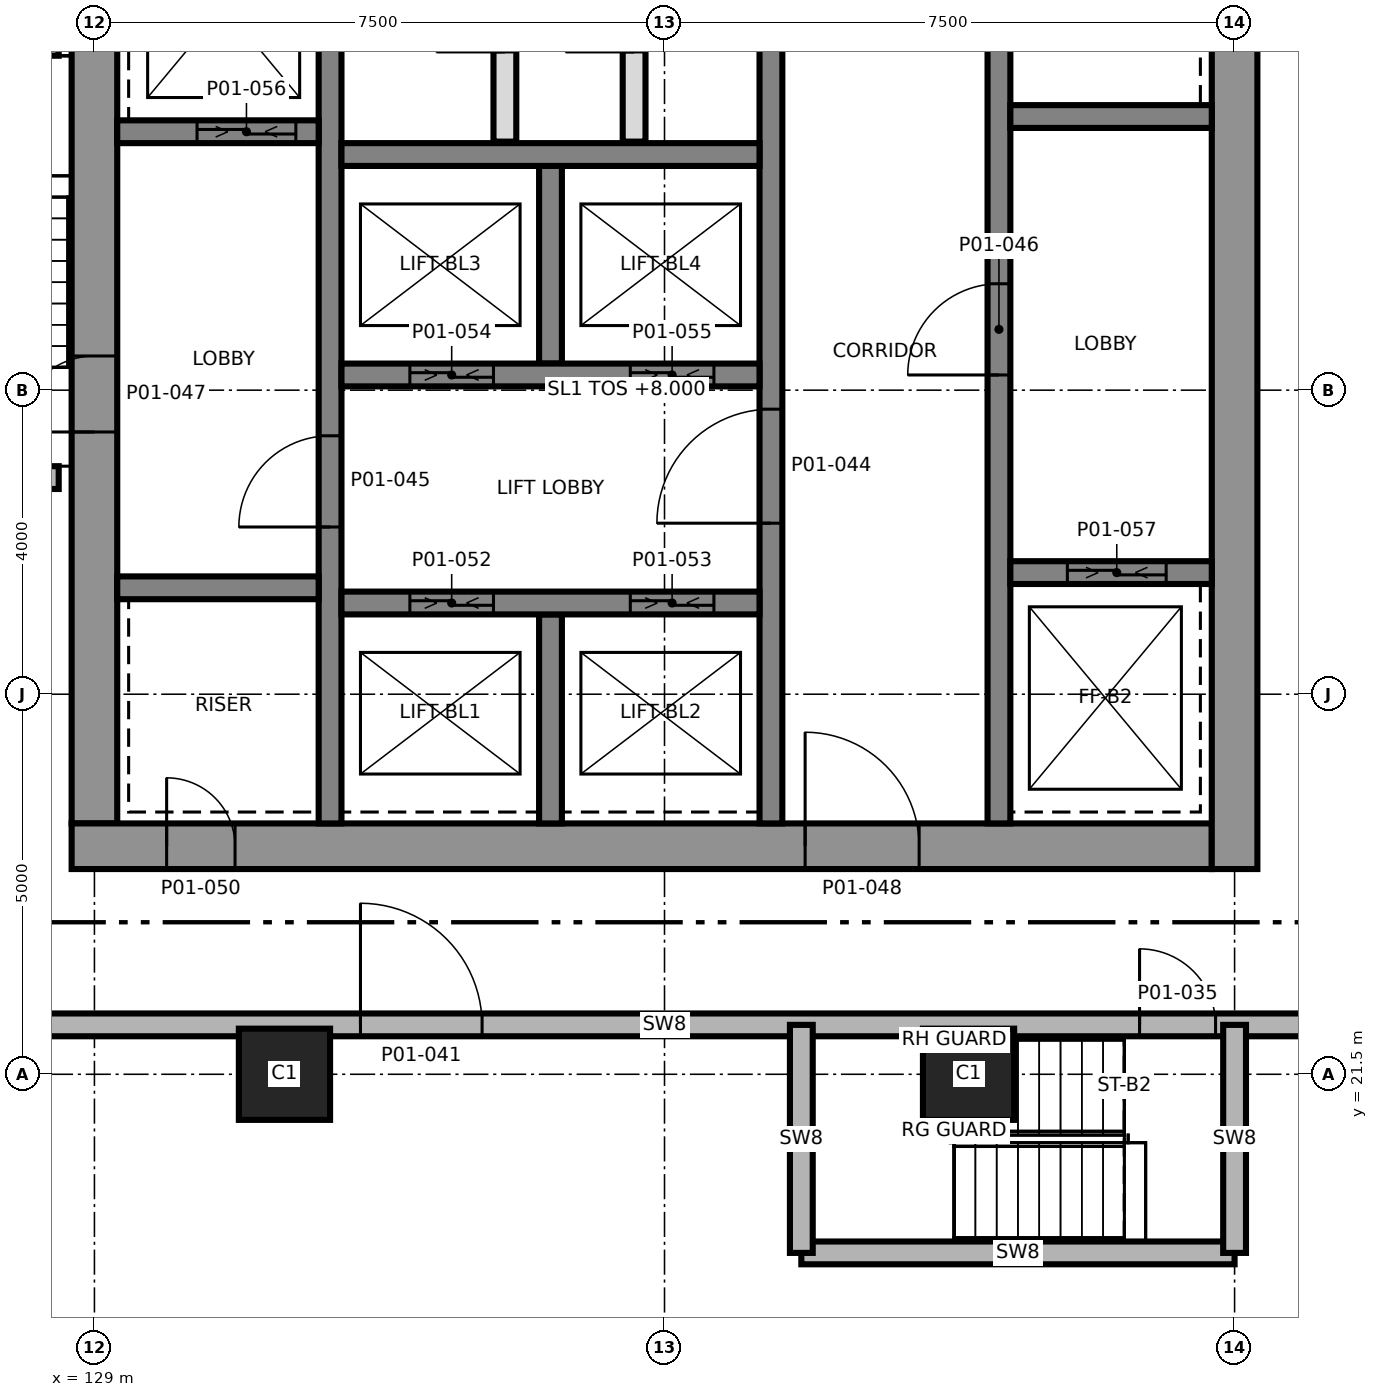
"""IFC4 building model, lengths in metres.
Left out: names, types, materials, properties, quantities, classifications, styles, units other than length and angle.
Written with IfcOpenShell. Run it as: python <this file> out.ifc"""

import sys

from ifc_helpers import new_model, si_unit, direction, frame, frame_2d, origin, origin_2d, place, context, subcontext, project, spatial, rectangle, extrude, element, fill, save


model = new_model("IFC4")
c1 = context("Model", 3, precision=1e-05, world=origin(), true_north=direction((0.0, 1.0)))
c2 = subcontext(c1, "Body", "Model", "MODEL_VIEW")
j1 = project(units=[si_unit("LENGTHUNIT", "METRE"), si_unit("PLANEANGLEUNIT", "RADIAN")], contexts=[c1])
p1 = place(None, origin())
s1 = spatial("IfcSite", under=j1, at=p1, CompositionType="ELEMENT")
p2 = place(p1, origin())
s2 = spatial("IfcBuilding", under=s1, at=p2, CompositionType="ELEMENT")
p3 = place(p2, frame((0.0, 0.0, 8.0)))
s3 = spatial("IfcBuildingStorey", under=s2, at=p3, CompositionType="ELEMENT", Elevation=8.0)
p4 = place(p3, frame((129.0, 24.8, 0.0), z_axis=(0.0, 0.0, 1.0), x_axis=(0.0, 1.0, 0.0)))
e1 = element("IfcWall", 1, at=p4, inside=s3, PredefinedType="SHEAR", context=c2, shape_type="SweptSolid", body=[
    extrude(rectangle(XDim=12.4, YDim=0.6, at=frame_2d((6.2, 0.0))), origin(), (0.0, 0.0, 1.0), 5.5),
])
p5 = place(p4, frame((5.15, 0.0, 0.0)))
e2 = element("IfcOpeningElement", 2, at=p5, cuts=e1, PredefinedType="OPENING", context=c2, shape_type="SweptSolid", body=[
    extrude(rectangle(XDim=1.0, YDim=2.1, at=frame_2d((0.5, 1.05))), frame((0.0, 0.31, 0.0), z_axis=(0.0, -1.0, 0.0), x_axis=(1.0, 0.0, 0.0)), (0.0, 0.0, 1.0), 0.62),
])
p6 = place(p3, frame((128.7, 24.5, 0.0), z_axis=(0.0, 0.0, 1.0), x_axis=(1.0, 0.0, 0.0)))
e3 = element("IfcWall", 3, at=p6, inside=s3, PredefinedType="SHEAR", context=c2, shape_type="SweptSolid", body=[
    extrude(rectangle(XDim=15.0, YDim=0.6, at=frame_2d((7.5, 0.0))), origin(), (0.0, 0.0, 1.0), 5.5),
])
p7 = place(p6, frame((9.65, 0.0, 0.0)))
e4 = element("IfcOpeningElement", 4, at=p7, cuts=e3, PredefinedType="OPENING", context=c2, shape_type="SweptSolid", body=[
    extrude(rectangle(XDim=1.5, YDim=2.1, at=frame_2d((0.75, 1.05))), frame((0.0, 0.31, 0.0), z_axis=(0.0, -1.0, 0.0), x_axis=(1.0, 0.0, 0.0)), (0.0, 0.0, 1.0), 0.62),
])
p8 = place(p6, frame((1.25, 0.0, 0.0)))
e5 = element("IfcOpeningElement", 5, at=p8, cuts=e3, PredefinedType="OPENING", context=c2, shape_type="SweptSolid", body=[
    extrude(rectangle(XDim=0.9, YDim=2.1, at=frame_2d((0.45, 1.05))), frame((0.0, 0.31, 0.0), z_axis=(0.0, -1.0, 0.0), x_axis=(1.0, 0.0, 0.0)), (0.0, 0.0, 1.0), 0.62),
])
p9 = place(p3, frame((144.0, 24.2, 0.0), z_axis=(0.0, 0.0, 1.0), x_axis=(0.0, 1.0, 0.0)))
e6 = element("IfcWall", 6, at=p9, inside=s3, PredefinedType="SHEAR", context=c2, shape_type="SweptSolid", body=[
    extrude(rectangle(XDim=13.6, YDim=0.6, at=frame_2d((6.8, 0.0))), origin(), (0.0, 0.0, 1.0), 5.5),
])
p10 = place(p3, frame((132.1, 24.8, 0.0), z_axis=(0.0, 0.0, 1.0), x_axis=(0.0, 1.0, 0.0)))
e7 = element("IfcWall", 7, at=p10, inside=s3, PredefinedType="SHEAR", context=c2, shape_type="SweptSolid", body=[
    extrude(rectangle(XDim=12.4, YDim=0.3, at=frame_2d((6.2, 0.0))), origin(), (0.0, 0.0, 1.0), 5.5),
])
p11 = place(p10, frame((3.9, 0.0, 0.0)))
e8 = element("IfcOpeningElement", 8, at=p11, cuts=e7, PredefinedType="OPENING", context=c2, shape_type="SweptSolid", body=[
    extrude(rectangle(XDim=1.2, YDim=2.1, at=frame_2d((0.6, 1.05))), frame((0.0, 0.16, 0.0), z_axis=(0.0, -1.0, 0.0), x_axis=(1.0, 0.0, 0.0)), (0.0, 0.0, 1.0), 0.32),
])
p12 = place(p3, frame((137.9, 24.8, 0.0), z_axis=(0.0, 0.0, 1.0), x_axis=(0.0, 1.0, 0.0)))
e9 = element("IfcWall", 9, at=p12, inside=s3, PredefinedType="SHEAR", context=c2, shape_type="SweptSolid", body=[
    extrude(rectangle(XDim=12.4, YDim=0.3, at=frame_2d((6.2, 0.0))), origin(), (0.0, 0.0, 1.0), 5.5),
])
p13 = place(p12, frame((3.95, 0.0, 0.0)))
e10 = element("IfcOpeningElement", 10, at=p13, cuts=e9, PredefinedType="OPENING", context=c2, shape_type="SweptSolid", body=[
    extrude(rectangle(XDim=1.5, YDim=2.1, at=frame_2d((0.75, 1.05))), frame((0.0, 0.16, 0.0), z_axis=(0.0, -1.0, 0.0), x_axis=(1.0, 0.0, 0.0)), (0.0, 0.0, 1.0), 0.32),
])
p14 = place(p12, frame((10.45, 0.0, 0.0)))
e11 = element("IfcOpeningElement", 11, at=p14, cuts=e9, PredefinedType="OPENING", context=c2, shape_type="SweptSolid", body=[
    extrude(rectangle(XDim=0.9, YDim=2.1, at=frame_2d((0.45, 1.05))), frame((0.0, 0.16, 0.0), z_axis=(0.0, -1.0, 0.0), x_axis=(1.0, 0.0, 0.0)), (0.0, 0.0, 1.0), 0.32),
])
p15 = place(p3, frame((140.9, 24.8, 0.0), z_axis=(0.0, 0.0, 1.0), x_axis=(0.0, 1.0, 0.0)))
e12 = element("IfcWall", 12, at=p15, inside=s3, PredefinedType="SHEAR", context=c2, shape_type="SweptSolid", body=[
    extrude(rectangle(XDim=12.4, YDim=0.3, at=frame_2d((6.2, 0.0))), origin(), (0.0, 0.0, 1.0), 5.5),
])
p16 = place(p15, frame((5.9, 0.0, 0.0)))
e13 = element("IfcOpeningElement", 13, at=p16, cuts=e12, PredefinedType="OPENING", context=c2, shape_type="SweptSolid", body=[
    extrude(rectangle(XDim=1.2, YDim=2.1, at=frame_2d((0.6, 1.05))), frame((0.0, 0.16, 0.0), z_axis=(0.0, -1.0, 0.0), x_axis=(1.0, 0.0, 0.0)), (0.0, 0.0, 1.0), 0.32),
])
p17 = place(p3, frame((135.0, 24.8, 0.0), z_axis=(0.0, 0.0, 1.0), x_axis=(0.0, 1.0, 0.0)))
e14 = element("IfcWall", 14, at=p17, inside=s3, PredefinedType="SHEAR", context=c2, shape_type="SweptSolid", body=[
    extrude(rectangle(XDim=2.75, YDim=0.3, at=frame_2d((1.375, 0.0))), origin(), (0.0, 0.0, 1.0), 5.5),
])
p18 = place(p3, frame((135.0, 30.85, 0.0), z_axis=(0.0, 0.0, 1.0), x_axis=(0.0, 1.0, 0.0)))
e15 = element("IfcWall", 15, at=p18, inside=s3, PredefinedType="SHEAR", context=c2, shape_type="SweptSolid", body=[
    extrude(rectangle(XDim=2.6, YDim=0.3, at=frame_2d((1.3, 0.0))), origin(), (0.0, 0.0, 1.0), 5.5),
])
p19 = place(p3, frame((132.25, 27.7, 0.0), z_axis=(0.0, 0.0, 1.0), x_axis=(1.0, 0.0, 0.0)))
e16 = element("IfcWall", 16, at=p19, inside=s3, PredefinedType="SHEAR", context=c2, shape_type="SweptSolid", body=[
    extrude(rectangle(XDim=5.5, YDim=0.3, at=frame_2d((2.75, 0.0))), origin(), (0.0, 0.0, 1.0), 5.5),
])
p20 = place(p19, frame((0.9, 0.0, 0.0)))
e17 = element("IfcOpeningElement", 17, at=p20, cuts=e16, PredefinedType="OPENING", context=c2, shape_type="SweptSolid", body=[
    extrude(rectangle(XDim=1.1, YDim=2.4, at=frame_2d((0.55, 1.2))), frame((0.0, 0.16, 0.0), z_axis=(0.0, -1.0, 0.0), x_axis=(1.0, 0.0, 0.0)), (0.0, 0.0, 1.0), 0.32),
])
p21 = place(p19, frame((3.8, 0.0, 0.0)))
e18 = element("IfcOpeningElement", 18, at=p21, cuts=e16, PredefinedType="OPENING", context=c2, shape_type="SweptSolid", body=[
    extrude(rectangle(XDim=1.1, YDim=2.4, at=frame_2d((0.55, 1.2))), frame((0.0, 0.16, 0.0), z_axis=(0.0, -1.0, 0.0), x_axis=(1.0, 0.0, 0.0)), (0.0, 0.0, 1.0), 0.32),
])
p22 = place(p3, frame((132.25, 30.7, 0.0), z_axis=(0.0, 0.0, 1.0), x_axis=(1.0, 0.0, 0.0)))
e19 = element("IfcWall", 19, at=p22, inside=s3, PredefinedType="SHEAR", context=c2, shape_type="SweptSolid", body=[
    extrude(rectangle(XDim=5.5, YDim=0.3, at=frame_2d((2.75, 0.0))), origin(), (0.0, 0.0, 1.0), 5.5),
])
p23 = place(p22, frame((0.9, 0.0, 0.0)))
e20 = element("IfcOpeningElement", 20, at=p23, cuts=e19, PredefinedType="OPENING", context=c2, shape_type="SweptSolid", body=[
    extrude(rectangle(XDim=1.1, YDim=2.4, at=frame_2d((0.55, 1.2))), frame((0.0, 0.16, 0.0), z_axis=(0.0, -1.0, 0.0), x_axis=(1.0, 0.0, 0.0)), (0.0, 0.0, 1.0), 0.32),
])
p24 = place(p22, frame((3.8, 0.0, 0.0)))
e21 = element("IfcOpeningElement", 21, at=p24, cuts=e19, PredefinedType="OPENING", context=c2, shape_type="SweptSolid", body=[
    extrude(rectangle(XDim=1.1, YDim=2.4, at=frame_2d((0.55, 1.2))), frame((0.0, 0.16, 0.0), z_axis=(0.0, -1.0, 0.0), x_axis=(1.0, 0.0, 0.0)), (0.0, 0.0, 1.0), 0.32),
])
p25 = place(p3, frame((132.25, 33.6, 0.0), z_axis=(0.0, 0.0, 1.0), x_axis=(1.0, 0.0, 0.0)))
e22 = element("IfcWall", 22, at=p25, inside=s3, PredefinedType="SHEAR", context=c2, shape_type="SweptSolid", body=[
    extrude(rectangle(XDim=5.5, YDim=0.3, at=frame_2d((2.75, 0.0))), origin(), (0.0, 0.0, 1.0), 5.5),
])
p26 = place(p3, frame((129.3, 27.9, 0.0), z_axis=(0.0, 0.0, 1.0), x_axis=(1.0, 0.0, 0.0)))
e23 = element("IfcWall", 23, at=p26, inside=s3, PredefinedType="SHEAR", context=c2, shape_type="SweptSolid", body=[
    extrude(rectangle(XDim=2.65, YDim=0.3, at=frame_2d((1.325, 0.0))), origin(), (0.0, 0.0, 1.0), 5.5),
])
p27 = place(p3, frame((129.3, 33.9, 0.0), z_axis=(0.0, 0.0, 1.0), x_axis=(1.0, 0.0, 0.0)))
e24 = element("IfcWall", 24, at=p27, inside=s3, PredefinedType="SHEAR", context=c2, shape_type="SweptSolid", body=[
    extrude(rectangle(XDim=2.65, YDim=0.3, at=frame_2d((1.325, 0.0))), origin(), (0.0, 0.0, 1.0), 5.5),
])
p28 = place(p27, frame((1.05, 0.0, 0.0)))
e25 = element("IfcOpeningElement", 25, at=p28, cuts=e24, PredefinedType="OPENING", context=c2, shape_type="SweptSolid", body=[
    extrude(rectangle(XDim=1.3, YDim=2.4, at=frame_2d((0.65, 1.2))), frame((0.0, 0.16, 0.0), z_axis=(0.0, -1.0, 0.0), x_axis=(1.0, 0.0, 0.0)), (0.0, 0.0, 1.0), 0.32),
])
p29 = place(p3, frame((141.05, 28.1, 0.0), z_axis=(0.0, 0.0, 1.0), x_axis=(1.0, 0.0, 0.0)))
e26 = element("IfcWall", 26, at=p29, inside=s3, PredefinedType="SHEAR", context=c2, shape_type="SweptSolid", body=[
    extrude(rectangle(XDim=2.65, YDim=0.3, at=frame_2d((1.325, 0.0))), origin(), (0.0, 0.0, 1.0), 5.5),
])
p30 = place(p29, frame((0.75, 0.0, 0.0)))
e27 = element("IfcOpeningElement", 27, at=p30, cuts=e26, PredefinedType="OPENING", context=c2, shape_type="SweptSolid", body=[
    extrude(rectangle(XDim=1.3, YDim=2.4, at=frame_2d((0.65, 1.2))), frame((0.0, 0.16, 0.0), z_axis=(0.0, -1.0, 0.0), x_axis=(1.0, 0.0, 0.0)), (0.0, 0.0, 1.0), 0.32),
])
p31 = place(p3, frame((141.05, 34.1, 0.0), z_axis=(0.0, 0.0, 1.0), x_axis=(1.0, 0.0, 0.0)))
e28 = element("IfcWall", 28, at=p31, inside=s3, PredefinedType="SHEAR", context=c2, shape_type="SweptSolid", body=[
    extrude(rectangle(XDim=2.65, YDim=0.3, at=frame_2d((1.325, 0.0))), origin(), (0.0, 0.0, 1.0), 5.5),
])
for number, where, z_axis, x_axis in (
    (29, (131.5, 21.5, 0.0), (0.0, 0.0, 1.0), (1.0, 0.0, 0.0)),
    (30, (140.5, 21.5, 0.0), (0.0, 0.0, 1.0), (1.0, 0.0, 0.0)),
):
    element("IfcColumn", number, at=place(p3, frame(where, z_axis=z_axis, x_axis=x_axis)), inside=s3, PredefinedType="COLUMN", context=c2, shape_type="SweptSolid", body=[
        extrude(rectangle(XDim=1.2, YDim=1.2, at=origin_2d()), origin(), (0.0, 0.0, 1.0), 5.5),
    ])
p32 = place(p3, frame((138.3, 19.15, 0.0), z_axis=(0.0, 0.0, 1.0), x_axis=(1.0, 0.0, 0.0)))
e31 = element("IfcWall", 31, at=p32, inside=s3, PredefinedType="SHEAR", context=c2, shape_type="SweptSolid", body=[
    extrude(rectangle(XDim=5.7, YDim=0.3, at=frame_2d((2.85, 0.0))), origin(), (0.0, 0.0, 1.0), 5.2),
])
p33 = place(p3, frame((125.75, 22.15, 0.0), z_axis=(0.0, 0.0, 1.0), x_axis=(1.0, 0.0, 0.0)))
e32 = element("IfcWall", 32, at=p33, inside=s3, PredefinedType="SHEAR", context=c2, shape_type="SweptSolid", body=[
    extrude(rectangle(XDim=21.5, YDim=0.3, at=frame_2d((10.75, 0.0))), origin(), (0.0, 0.0, 1.0), 5.2),
])
p34 = place(p33, frame((17.0, 0.0, 0.0)))
e33 = element("IfcOpeningElement", 33, at=p34, cuts=e32, PredefinedType="OPENING", context=c2, shape_type="SweptSolid", body=[
    extrude(rectangle(XDim=1.0, YDim=2.1, at=frame_2d((0.5, 1.05))), frame((0.0, 0.16, 0.0), z_axis=(0.0, -1.0, 0.0), x_axis=(1.0, 0.0, 0.0)), (0.0, 0.0, 1.0), 0.32),
])
p35 = place(p33, frame((6.75, 0.0, 0.0)))
e34 = element("IfcOpeningElement", 34, at=p35, cuts=e32, PredefinedType="OPENING", context=c2, shape_type="SweptSolid", body=[
    extrude(rectangle(XDim=1.6, YDim=2.1, at=frame_2d((0.8, 1.05))), frame((0.0, 0.16, 0.0), z_axis=(0.0, -1.0, 0.0), x_axis=(1.0, 0.0, 0.0)), (0.0, 0.0, 1.0), 0.32),
])
p36 = place(p3, frame((125.7, 29.35, 0.0), z_axis=(0.0, 0.0, 1.0), x_axis=(1.0, 0.0, 0.0)))
e35 = element("IfcWall", 35, at=p36, inside=s3, PredefinedType="SHEAR", context=c2, shape_type="SweptSolid", body=[
    extrude(rectangle(XDim=2.83, YDim=0.3, at=frame_2d((1.415, 0.0))), origin(), (0.0, 0.0, 1.0), 5.2),
])
p37 = place(p36, frame((0.975, 0.0, 0.0)))
e36 = element("IfcOpeningElement", 36, at=p37, cuts=e35, PredefinedType="OPENING", context=c2, shape_type="SweptSolid", body=[
    extrude(rectangle(XDim=1.2, YDim=2.1, at=frame_2d((0.6, 1.05))), frame((0.0, 0.16, 0.0), z_axis=(0.0, -1.0, 0.0), x_axis=(1.0, 0.0, 0.0)), (0.0, 0.0, 1.0), 0.32),
])
p38 = place(p3, frame((125.7, 35.05, 0.0), z_axis=(0.0, 0.0, 1.0), x_axis=(1.0, 0.0, 0.0)))
e37 = element("IfcWall", 37, at=p38, inside=s3, PredefinedType="SHEAR", context=c2, shape_type="SweptSolid", body=[
    extrude(rectangle(XDim=2.83, YDim=0.3, at=frame_2d((1.415, 0.0))), origin(), (0.0, 0.0, 1.0), 5.2),
])
p39 = place(p3, frame((134.4, 33.77, 0.0), z_axis=(0.0, 0.0, 1.0), x_axis=(0.0, 1.0, 0.0)))
e38 = element("IfcWall", 38, at=p39, inside=s3, PredefinedType="PARTITIONING", context=c2, shape_type="SweptSolid", body=[
    extrude(rectangle(XDim=3.26, YDim=0.3, at=frame_2d((1.63, 0.0))), origin(), (0.0, 0.0, 1.0), 5.2),
])
p40 = place(p39, frame((1.18, 0.0, 0.0)))
e39 = element("IfcOpeningElement", 39, at=p40, cuts=e38, PredefinedType="OPENING", context=c2, shape_type="SweptSolid", body=[
    extrude(rectangle(XDim=0.9, YDim=2.1, at=frame_2d((0.45, 1.05))), frame((0.0, 0.16, 0.0), z_axis=(0.0, -1.0, 0.0), x_axis=(1.0, 0.0, 0.0)), (0.0, 0.0, 1.0), 0.32),
])
p41 = place(p3, frame((136.1, 33.77, 0.0), z_axis=(0.0, 0.0, 1.0), x_axis=(0.0, 1.0, 0.0)))
e40 = element("IfcWall", 40, at=p41, inside=s3, PredefinedType="PARTITIONING", context=c2, shape_type="SweptSolid", body=[
    extrude(rectangle(XDim=3.26, YDim=0.3, at=frame_2d((1.63, 0.0))), origin(), (0.0, 0.0, 1.0), 5.2),
])
p42 = place(p41, frame((1.18, 0.0, 0.0)))
e41 = element("IfcOpeningElement", 41, at=p42, cuts=e40, PredefinedType="OPENING", context=c2, shape_type="SweptSolid", body=[
    extrude(rectangle(XDim=0.9, YDim=2.1, at=frame_2d((0.45, 1.05))), frame((0.0, 0.16, 0.0), z_axis=(0.0, -1.0, 0.0), x_axis=(1.0, 0.0, 0.0)), (0.0, 0.0, 1.0), 0.32),
])
for number, where, z_axis, x_axis in (
    (42, (138.3, 19.15, 0.0), (0.0, 0.0, 1.0), (0.0, 1.0, 0.0)),
    (43, (144.0, 19.15, 0.0), (0.0, 0.0, 1.0), (0.0, 1.0, 0.0)),
):
    element("IfcWall", number, at=place(p3, frame(where, z_axis=z_axis, x_axis=x_axis)), inside=s3, PredefinedType="SHEAR", context=c2, shape_type="SweptSolid", body=[
        extrude(rectangle(XDim=3.0, YDim=0.3, at=frame_2d((1.5, 0.0))), origin(), (0.0, 0.0, 1.0), 5.2),
    ])
p43 = place(p34, origin())
e44 = element("IfcDoor", 44, at=p43, inside=s3, OperationType="SINGLE_SWING_LEFT", PredefinedType="DOOR", context=c2, shape_type="SweptSolid", body=[
    extrude(rectangle(XDim=1.0, YDim=2.1, at=frame_2d((0.5, 1.05))), frame((0.0, 0.025, 0.0), z_axis=(0.0, -1.0, 0.0), x_axis=(1.0, 0.0, 0.0)), (0.0, 0.0, 1.0), 0.05),
])
fill(e33, e44)
p44 = place(p35, origin())
e45 = element("IfcDoor", 45, at=p44, inside=s3, OperationType="SINGLE_SWING_LEFT", PredefinedType="DOOR", context=c2, shape_type="SweptSolid", body=[
    extrude(rectangle(XDim=1.6, YDim=2.1, at=frame_2d((0.8, 1.05))), frame((0.0, 0.025, 0.0), z_axis=(0.0, -1.0, 0.0), x_axis=(1.0, 0.0, 0.0)), (0.0, 0.0, 1.0), 0.05),
])
fill(e34, e45)
p45 = place(p13, origin())
e46 = element("IfcDoor", 46, at=p45, inside=s3, OperationType="SINGLE_SWING_RIGHT", PredefinedType="DOOR", context=c2, shape_type="SweptSolid", body=[
    extrude(rectangle(XDim=1.5, YDim=2.1, at=frame_2d((0.75, 1.05))), frame((0.0, 0.025, 0.0), z_axis=(0.0, -1.0, 0.0), x_axis=(1.0, 0.0, 0.0)), (0.0, 0.0, 1.0), 0.05),
])
fill(e10, e46)
p46 = place(p11, origin())
e47 = element("IfcDoor", 47, at=p46, inside=s3, OperationType="SINGLE_SWING_LEFT", PredefinedType="DOOR", context=c2, shape_type="SweptSolid", body=[
    extrude(rectangle(XDim=1.2, YDim=2.1, at=frame_2d((0.6, 1.05))), frame((0.0, 0.025, 0.0), z_axis=(0.0, -1.0, 0.0), x_axis=(1.0, 0.0, 0.0)), (0.0, 0.0, 1.0), 0.05),
])
fill(e8, e47)
p47 = place(p16, origin())
e48 = element("IfcDoor", 48, at=p47, inside=s3, OperationType="SINGLE_SWING_RIGHT", PredefinedType="DOOR", context=c2, shape_type="SweptSolid", body=[
    extrude(rectangle(XDim=1.2, YDim=2.1, at=frame_2d((0.6, 1.05))), frame((0.0, 0.025, 0.0), z_axis=(0.0, -1.0, 0.0), x_axis=(1.0, 0.0, 0.0)), (0.0, 0.0, 1.0), 0.05),
])
fill(e13, e48)
p48 = place(p5, origin())
e49 = element("IfcDoor", 49, at=p48, inside=s3, OperationType="SINGLE_SWING_RIGHT", PredefinedType="DOOR", context=c2, shape_type="SweptSolid", body=[
    extrude(rectangle(XDim=1.0, YDim=2.1, at=frame_2d((0.5, 1.05))), frame((0.0, 0.025, 0.0), z_axis=(0.0, -1.0, 0.0), x_axis=(1.0, 0.0, 0.0)), (0.0, 0.0, 1.0), 0.05),
])
fill(e2, e49)
p49 = place(p7, origin())
e50 = element("IfcDoor", 50, at=p49, inside=s3, OperationType="SINGLE_SWING_LEFT", PredefinedType="DOOR", context=c2, shape_type="SweptSolid", body=[
    extrude(rectangle(XDim=1.5, YDim=2.1, at=frame_2d((0.75, 1.05))), frame((0.0, 0.025, 0.0), z_axis=(0.0, -1.0, 0.0), x_axis=(1.0, 0.0, 0.0)), (0.0, 0.0, 1.0), 0.05),
])
fill(e4, e50)
p50 = place(p8, origin())
e51 = element("IfcDoor", 51, at=p50, inside=s3, OperationType="SINGLE_SWING_LEFT", PredefinedType="DOOR", context=c2, shape_type="SweptSolid", body=[
    extrude(rectangle(XDim=0.9, YDim=2.1, at=frame_2d((0.45, 1.05))), frame((0.0, 0.025, 0.0), z_axis=(0.0, -1.0, 0.0), x_axis=(1.0, 0.0, 0.0)), (0.0, 0.0, 1.0), 0.05),
])
fill(e5, e51)
p51 = place(p20, origin())
e52 = element("IfcDoor", 52, at=p51, inside=s3, OperationType="SLIDING_TO_LEFT", PredefinedType="DOOR", context=c2, shape_type="SweptSolid", body=[
    extrude(rectangle(XDim=1.1, YDim=2.4, at=frame_2d((0.55, 1.2))), frame((0.0, 0.025, 0.0), z_axis=(0.0, -1.0, 0.0), x_axis=(1.0, 0.0, 0.0)), (0.0, 0.0, 1.0), 0.05),
])
fill(e17, e52)
p52 = place(p21, origin())
e53 = element("IfcDoor", 53, at=p52, inside=s3, OperationType="SLIDING_TO_LEFT", PredefinedType="DOOR", context=c2, shape_type="SweptSolid", body=[
    extrude(rectangle(XDim=1.1, YDim=2.4, at=frame_2d((0.55, 1.2))), frame((0.0, 0.025, 0.0), z_axis=(0.0, -1.0, 0.0), x_axis=(1.0, 0.0, 0.0)), (0.0, 0.0, 1.0), 0.05),
])
fill(e18, e53)
p53 = place(p23, origin())
e54 = element("IfcDoor", 54, at=p53, inside=s3, OperationType="SLIDING_TO_LEFT", PredefinedType="DOOR", context=c2, shape_type="SweptSolid", body=[
    extrude(rectangle(XDim=1.1, YDim=2.4, at=frame_2d((0.55, 1.2))), frame((0.0, 0.025, 0.0), z_axis=(0.0, -1.0, 0.0), x_axis=(1.0, 0.0, 0.0)), (0.0, 0.0, 1.0), 0.05),
])
fill(e20, e54)
p54 = place(p24, origin())
e55 = element("IfcDoor", 55, at=p54, inside=s3, OperationType="SLIDING_TO_LEFT", PredefinedType="DOOR", context=c2, shape_type="SweptSolid", body=[
    extrude(rectangle(XDim=1.1, YDim=2.4, at=frame_2d((0.55, 1.2))), frame((0.0, 0.025, 0.0), z_axis=(0.0, -1.0, 0.0), x_axis=(1.0, 0.0, 0.0)), (0.0, 0.0, 1.0), 0.05),
])
fill(e21, e55)
p55 = place(p28, origin())
e56 = element("IfcDoor", 56, at=p55, inside=s3, OperationType="SLIDING_TO_LEFT", PredefinedType="DOOR", context=c2, shape_type="SweptSolid", body=[
    extrude(rectangle(XDim=1.3, YDim=2.4, at=frame_2d((0.65, 1.2))), frame((0.0, 0.025, 0.0), z_axis=(0.0, -1.0, 0.0), x_axis=(1.0, 0.0, 0.0)), (0.0, 0.0, 1.0), 0.05),
])
fill(e25, e56)
p56 = place(p30, origin())
e57 = element("IfcDoor", 57, at=p56, inside=s3, OperationType="SLIDING_TO_LEFT", PredefinedType="DOOR", context=c2, shape_type="SweptSolid", body=[
    extrude(rectangle(XDim=1.3, YDim=2.4, at=frame_2d((0.65, 1.2))), frame((0.0, 0.025, 0.0), z_axis=(0.0, -1.0, 0.0), x_axis=(1.0, 0.0, 0.0)), (0.0, 0.0, 1.0), 0.05),
])
fill(e27, e57)
save(model, sys.argv[1])
